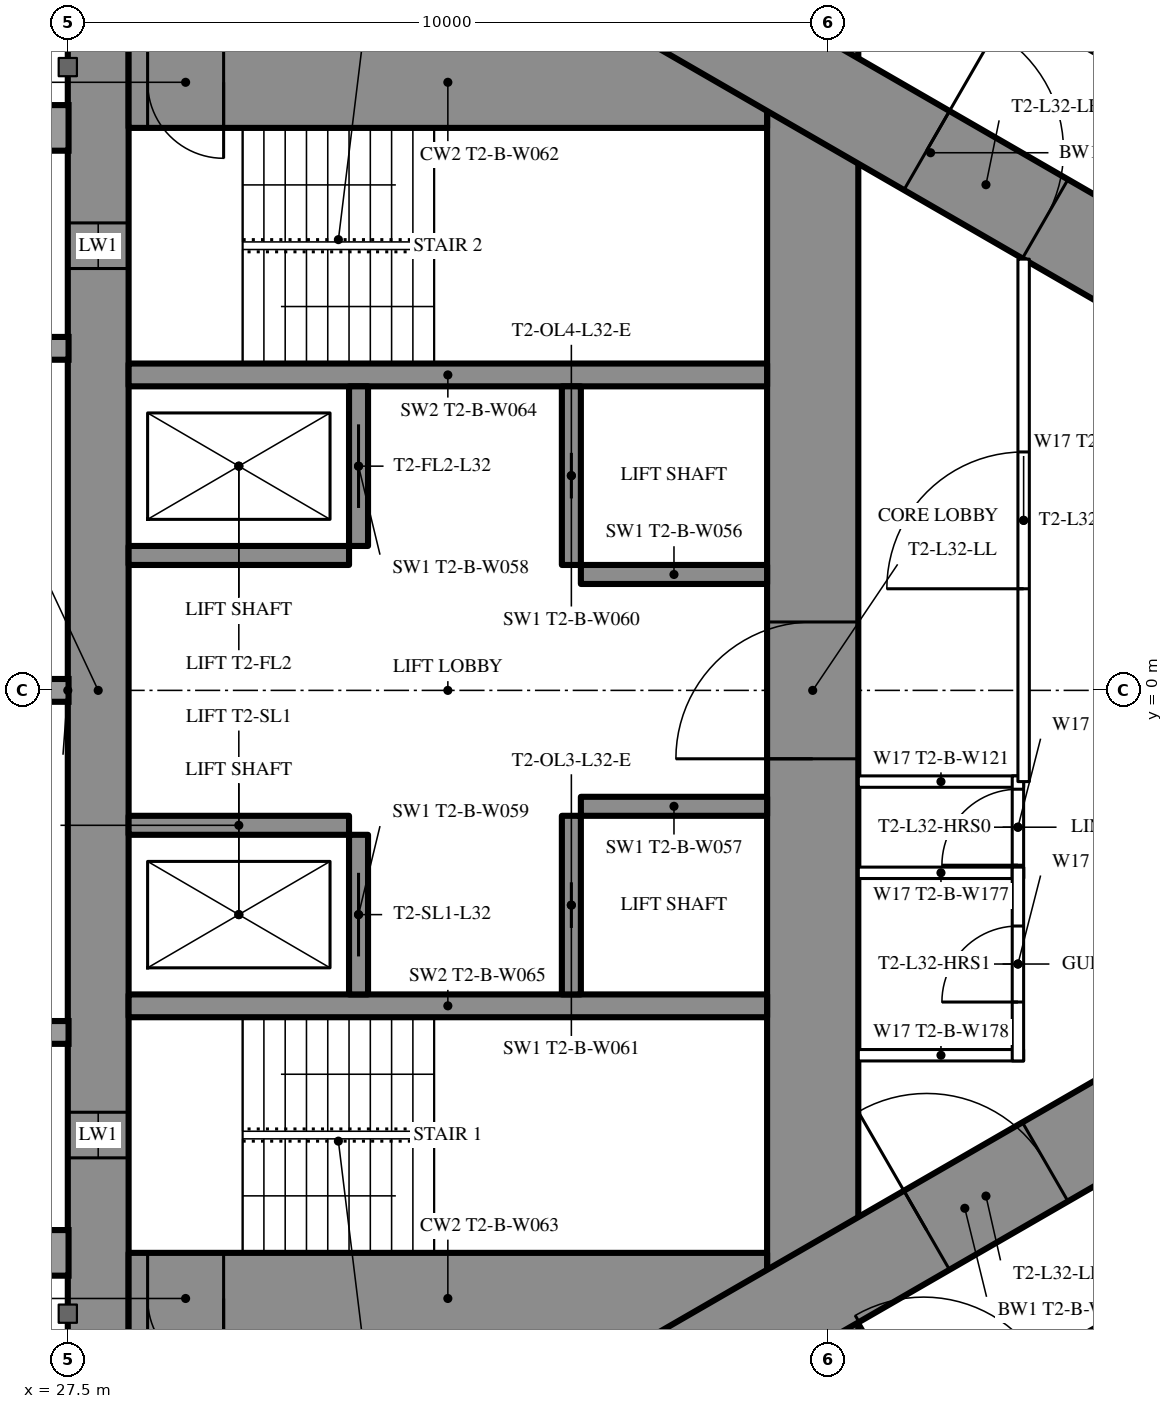
"""IFC4 building model, lengths in metres.
Left out: names, types, materials, properties, quantities, classifications, styles, units other than length and angle.
Written with IfcOpenShell. Run it as: python <this file> out.ifc"""

import sys

from ifc_helpers import new_model, si_unit, direction, frame, frame_2d, origin, place, context, subcontext, project, spatial, rectangle, extrude, element, fill, save


model = new_model("IFC4")
c1 = context("Model", 3, precision=1e-05, world=origin(), true_north=direction((0.0, 1.0)))
c2 = subcontext(c1, "Body", "Model", "MODEL_VIEW")
j1 = project(units=[si_unit("LENGTHUNIT", "METRE"), si_unit("PLANEANGLEUNIT", "RADIAN")], contexts=[c1])
p1 = place(None, origin())
s1 = spatial("IfcSite", under=j1, at=p1, CompositionType="ELEMENT")
p2 = place(p1, origin())
s2 = spatial("IfcBuilding", under=s1, at=p2, CompositionType="ELEMENT")
p3 = place(p2, frame((0.0, 0.0, 122.1)))
s3 = spatial("IfcBuildingStorey", under=s2, at=p3, CompositionType="ELEMENT", Elevation=122.1)
p4 = place(p3, frame((27.9, -8.6, 0.0), z_axis=(0.0, 0.0, 1.0), x_axis=(0.0, 1.0, 0.0)))
e1 = element("IfcWall", 1, at=p4, inside=s3, PredefinedType="SHEAR", context=c2, shape_type="SweptSolid", body=[
    extrude(rectangle(XDim=17.2, YDim=0.8, at=frame_2d((8.6, 0.0))), origin(), (0.0, 0.0, 1.0), 3.5),
])
p5 = place(p4, frame((2.45, 0.0, 0.6)))
e2 = element("IfcOpeningElement", 2, at=p5, cuts=e1, PredefinedType="OPENING", context=c2, shape_type="SweptSolid", body=[
    extrude(rectangle(XDim=0.6, YDim=2.1, at=frame_2d((0.3, 1.05))), frame((0.0, 0.41, 0.0), z_axis=(0.0, -1.0, 0.0), x_axis=(1.0, 0.0, 0.0)), (0.0, 0.0, 1.0), 0.82),
])
p6 = place(p4, frame((14.15, 0.0, 0.6)))
e3 = element("IfcOpeningElement", 3, at=p6, cuts=e1, PredefinedType="OPENING", context=c2, shape_type="SweptSolid", body=[
    extrude(rectangle(XDim=0.6, YDim=2.1, at=frame_2d((0.3, 1.05))), frame((0.0, 0.41, 0.0), z_axis=(0.0, -1.0, 0.0), x_axis=(1.0, 0.0, 0.0)), (0.0, 0.0, 1.0), 0.82),
])
p7 = place(p3, frame((37.3, -8.6, 0.0), z_axis=(0.0, 0.0, 1.0), x_axis=(0.0, 1.0, 0.0)))
e4 = element("IfcWall", 4, at=p7, inside=s3, PredefinedType="SHEAR", context=c2, shape_type="SweptSolid", body=[
    extrude(rectangle(XDim=17.2, YDim=1.2, at=frame_2d((8.6, 0.0))), origin(), (0.0, 0.0, 1.0), 3.5),
])
p8 = place(p7, frame((7.7, 0.0, 0.0)))
e5 = element("IfcOpeningElement", 5, at=p8, cuts=e4, PredefinedType="OPENING", context=c2, shape_type="SweptSolid", body=[
    extrude(rectangle(XDim=1.8, YDim=2.2, at=frame_2d((0.9, 1.1))), frame((0.0, 0.61, 0.0), z_axis=(0.0, -1.0, 0.0), x_axis=(1.0, 0.0, 0.0)), (0.0, 0.0, 1.0), 1.22),
])
p9 = place(p3, frame((28.3, -8.0, 0.0), z_axis=(0.0, 0.0, 1.0), x_axis=(1.0, 0.0, 0.0)))
e6 = element("IfcWall", 6, at=p9, inside=s3, PredefinedType="SHEAR", context=c2, shape_type="SweptSolid", body=[
    extrude(rectangle(XDim=8.4, YDim=1.2, at=frame_2d((4.2, 0.0))), origin(), (0.0, 0.0, 1.0), 3.5),
])
p10 = place(p9, frame((0.25, 0.0, 0.0)))
e7 = element("IfcOpeningElement", 7, at=p10, cuts=e6, PredefinedType="OPENING", context=c2, shape_type="SweptSolid", body=[
    extrude(rectangle(XDim=1.0, YDim=2.2, at=frame_2d((0.5, 1.1))), frame((0.0, 0.61, 0.0), z_axis=(0.0, -1.0, 0.0), x_axis=(1.0, 0.0, 0.0)), (0.0, 0.0, 1.0), 1.22),
])
p11 = place(p3, frame((28.3, 8.0, 0.0), z_axis=(0.0, 0.0, 1.0), x_axis=(1.0, 0.0, 0.0)))
e8 = element("IfcWall", 8, at=p11, inside=s3, PredefinedType="SHEAR", context=c2, shape_type="SweptSolid", body=[
    extrude(rectangle(XDim=8.4, YDim=1.2, at=frame_2d((4.2, 0.0))), origin(), (0.0, 0.0, 1.0), 3.5),
])
p12 = place(p11, frame((0.25, 0.0, 0.0)))
e9 = element("IfcOpeningElement", 9, at=p12, cuts=e8, PredefinedType="OPENING", context=c2, shape_type="SweptSolid", body=[
    extrude(rectangle(XDim=1.0, YDim=2.2, at=frame_2d((0.5, 1.1))), frame((0.0, 0.61, 0.0), z_axis=(0.0, -1.0, 0.0), x_axis=(1.0, 0.0, 0.0)), (0.0, 0.0, 1.0), 1.22),
])
for number, where, z_axis, x_axis in (
    (10, (28.3, -4.15, 0.0), (0.0, 0.0, 1.0), (1.0, 0.0, 0.0)),
    (11, (28.3, 4.15, 0.0), (0.0, 0.0, 1.0), (1.0, 0.0, 0.0)),
):
    element("IfcWall", number, at=place(p3, frame(where, z_axis=z_axis, x_axis=x_axis)), inside=s3, PredefinedType="SHEAR", context=c2, shape_type="SweptSolid", body=[
        extrude(rectangle(XDim=8.4, YDim=0.3, at=frame_2d((4.2, 0.0))), origin(), (0.0, 0.0, 1.0), 3.5),
    ])
p13 = place(p3, frame((31.325, -4.0, 0.0), z_axis=(0.0, 0.0, 1.0), x_axis=(0.0, 1.0, 0.0)))
e12 = element("IfcWall", 12, at=p13, inside=s3, PredefinedType="SHEAR", context=c2, shape_type="SweptSolid", body=[
    extrude(rectangle(XDim=2.1, YDim=0.25, at=frame_2d((1.05, 0.0))), origin(), (0.0, 0.0, 1.0), 3.5),
])
p14 = place(p13, frame((0.5, 0.0, 0.0)))
e13 = element("IfcOpeningElement", 13, at=p14, cuts=e12, PredefinedType="OPENING", context=c2, shape_type="SweptSolid", body=[
    extrude(rectangle(XDim=1.1, YDim=2.2, at=frame_2d((0.55, 1.1))), frame((0.0, 0.135, 0.0), z_axis=(0.0, -1.0, 0.0), x_axis=(1.0, 0.0, 0.0)), (0.0, 0.0, 1.0), 0.27),
])
p15 = place(p3, frame((34.125, -4.0, 0.0), z_axis=(0.0, 0.0, 1.0), x_axis=(0.0, 1.0, 0.0)))
e14 = element("IfcWall", 14, at=p15, inside=s3, PredefinedType="SHEAR", context=c2, shape_type="SweptSolid", body=[
    extrude(rectangle(XDim=2.35, YDim=0.25, at=frame_2d((1.175, 0.0))), origin(), (0.0, 0.0, 1.0), 3.5),
])
p16 = place(p15, frame((0.875, 0.0, 0.0)))
e15 = element("IfcOpeningElement", 15, at=p16, cuts=e14, PredefinedType="OPENING", context=c2, shape_type="SweptSolid", body=[
    extrude(rectangle(XDim=0.6, YDim=2.0, at=frame_2d((0.3, 1.0))), frame((0.0, 0.135, 0.0), z_axis=(0.0, -1.0, 0.0), x_axis=(1.0, 0.0, 0.0)), (0.0, 0.0, 1.0), 0.27),
])
p17 = place(p3, frame((28.3, -1.775, 0.0), z_axis=(0.0, 0.0, 1.0), x_axis=(1.0, 0.0, 0.0)))
e16 = element("IfcWall", 16, at=p17, inside=s3, PredefinedType="SHEAR", context=c2, shape_type="SweptSolid", body=[
    extrude(rectangle(XDim=2.9, YDim=0.25, at=frame_2d((1.45, 0.0))), origin(), (0.0, 0.0, 1.0), 3.5),
])
p18 = place(p3, frame((34.25, -1.525, 0.0), z_axis=(0.0, 0.0, 1.0), x_axis=(1.0, 0.0, 0.0)))
e17 = element("IfcWall", 17, at=p18, inside=s3, PredefinedType="SHEAR", context=c2, shape_type="SweptSolid", body=[
    extrude(rectangle(XDim=2.45, YDim=0.25, at=frame_2d((1.225, 0.0))), origin(), (0.0, 0.0, 1.0), 3.5),
])
p19 = place(p3, frame((31.325, 1.9, 0.0), z_axis=(0.0, 0.0, 1.0), x_axis=(0.0, 1.0, 0.0)))
e18 = element("IfcWall", 18, at=p19, inside=s3, PredefinedType="SHEAR", context=c2, shape_type="SweptSolid", body=[
    extrude(rectangle(XDim=2.1, YDim=0.25, at=frame_2d((1.05, 0.0))), origin(), (0.0, 0.0, 1.0), 3.5),
])
p20 = place(p19, frame((0.5, 0.0, 0.0)))
e19 = element("IfcOpeningElement", 19, at=p20, cuts=e18, PredefinedType="OPENING", context=c2, shape_type="SweptSolid", body=[
    extrude(rectangle(XDim=1.1, YDim=2.2, at=frame_2d((0.55, 1.1))), frame((0.0, 0.135, 0.0), z_axis=(0.0, -1.0, 0.0), x_axis=(1.0, 0.0, 0.0)), (0.0, 0.0, 1.0), 0.27),
])
p21 = place(p3, frame((34.125, 1.65, 0.0), z_axis=(0.0, 0.0, 1.0), x_axis=(0.0, 1.0, 0.0)))
e20 = element("IfcWall", 20, at=p21, inside=s3, PredefinedType="SHEAR", context=c2, shape_type="SweptSolid", body=[
    extrude(rectangle(XDim=2.35, YDim=0.25, at=frame_2d((1.175, 0.0))), origin(), (0.0, 0.0, 1.0), 3.5),
])
p22 = place(p21, frame((0.875, 0.0, 0.0)))
e21 = element("IfcOpeningElement", 21, at=p22, cuts=e20, PredefinedType="OPENING", context=c2, shape_type="SweptSolid", body=[
    extrude(rectangle(XDim=0.6, YDim=2.0, at=frame_2d((0.3, 1.0))), frame((0.0, 0.135, 0.0), z_axis=(0.0, -1.0, 0.0), x_axis=(1.0, 0.0, 0.0)), (0.0, 0.0, 1.0), 0.27),
])
p23 = place(p3, frame((28.3, 1.775, 0.0), z_axis=(0.0, 0.0, 1.0), x_axis=(1.0, 0.0, 0.0)))
e22 = element("IfcWall", 22, at=p23, inside=s3, PredefinedType="SHEAR", context=c2, shape_type="SweptSolid", body=[
    extrude(rectangle(XDim=2.9, YDim=0.25, at=frame_2d((1.45, 0.0))), origin(), (0.0, 0.0, 1.0), 3.5),
])
p24 = place(p3, frame((34.25, 1.525, 0.0), z_axis=(0.0, 0.0, 1.0), x_axis=(1.0, 0.0, 0.0)))
e23 = element("IfcWall", 23, at=p24, inside=s3, PredefinedType="SHEAR", context=c2, shape_type="SweptSolid", body=[
    extrude(rectangle(XDim=2.45, YDim=0.25, at=frame_2d((1.225, 0.0))), origin(), (0.0, 0.0, 1.0), 3.5),
])
p25 = place(p3, frame((27.2, -13.8, 0.0), z_axis=(0.0, 0.0, 1.0), x_axis=(0.866027159892, 0.499996958321, 0.0)))
e24 = element("IfcWall", 24, at=p25, inside=s3, PredefinedType="SHEAR", context=c2, shape_type="SweptSolid", body=[
    extrude(rectangle(XDim=27.947, YDim=1.2, at=frame_2d((13.973, 0.0))), origin(), (0.0, 0.0, 1.0), 3.5),
])
p26 = place(p25, frame((4.6, 0.0, 0.0)))
e25 = element("IfcOpeningElement", 25, at=p26, cuts=e24, PredefinedType="OPENING", context=c2, shape_type="SweptSolid", body=[
    extrude(rectangle(XDim=1.0, YDim=2.2, at=frame_2d((0.5, 1.1))), frame((0.0, 0.61, 0.0), z_axis=(0.0, -1.0, 0.0), x_axis=(1.0, 0.0, 0.0)), (0.0, 0.0, 1.0), 1.22),
])
p27 = place(p25, frame((13.395, 0.0, 0.0)))
e26 = element("IfcOpeningElement", 26, at=p27, cuts=e24, PredefinedType="OPENING", context=c2, shape_type="SweptSolid", body=[
    extrude(rectangle(XDim=1.8, YDim=2.2, at=frame_2d((0.9, 1.1))), frame((0.0, 0.61, 0.0), z_axis=(0.0, -1.0, 0.0), x_axis=(1.0, 0.0, 0.0)), (0.0, 0.0, 1.0), 1.22),
])
p28 = place(p3, frame((27.2, 13.8, 0.0), z_axis=(0.0, 0.0, 1.0), x_axis=(0.866024515034, -0.500001539357, 0.0)))
e27 = element("IfcWall", 27, at=p28, inside=s3, PredefinedType="SHEAR", context=c2, shape_type="SweptSolid", body=[
    extrude(rectangle(XDim=26.907, YDim=1.2, at=frame_2d((13.454, 0.0))), origin(), (0.0, 0.0, 1.0), 3.5),
])
p29 = place(p28, frame((4.6, 0.0, 0.0)))
e28 = element("IfcOpeningElement", 28, at=p29, cuts=e27, PredefinedType="OPENING", context=c2, shape_type="SweptSolid", body=[
    extrude(rectangle(XDim=1.0, YDim=2.2, at=frame_2d((0.5, 1.1))), frame((0.0, 0.61, 0.0), z_axis=(0.0, -1.0, 0.0), x_axis=(1.0, 0.0, 0.0)), (0.0, 0.0, 1.0), 1.22),
])
p30 = place(p28, frame((13.395, 0.0, 0.0)))
e29 = element("IfcOpeningElement", 29, at=p30, cuts=e27, PredefinedType="OPENING", context=c2, shape_type="SweptSolid", body=[
    extrude(rectangle(XDim=1.8, YDim=2.2, at=frame_2d((0.9, 1.1))), frame((0.0, 0.61, 0.0), z_axis=(0.0, -1.0, 0.0), x_axis=(1.0, 0.0, 0.0)), (0.0, 0.0, 1.0), 1.22),
])
p31 = place(p3, frame((36.834, 10.894, 0.0), z_axis=(0.0, 0.0, 1.0), x_axis=(0.866028157229, -0.499995230863, 0.0)))
e30 = element("IfcWall", 30, at=p31, inside=s3, PredefinedType="PARTITIONING", context=c2, shape_type="SweptSolid", body=[
    extrude(rectangle(XDim=21.667, YDim=0.2, at=frame_2d((10.833, 0.0))), origin(), (0.0, 0.0, 1.0), 3.25),
])
p32 = place(p31, frame((20.117, 0.0, 0.0)))
e31 = element("IfcOpeningElement", 31, at=p32, cuts=e30, PredefinedType="OPENING", context=c2, shape_type="SweptSolid", body=[
    extrude(rectangle(XDim=0.95, YDim=2.2, at=frame_2d((0.475, 1.1))), frame((0.0, 0.11, 0.0), z_axis=(0.0, -1.0, 0.0), x_axis=(1.0, 0.0, 0.0)), (0.0, 0.0, 1.0), 0.22),
])
p33 = place(p31, frame((14.04, 0.0, 0.0)))
e32 = element("IfcOpeningElement", 32, at=p33, cuts=e30, PredefinedType="OPENING", context=c2, shape_type="SweptSolid", body=[
    extrude(rectangle(XDim=0.95, YDim=2.2, at=frame_2d((0.475, 1.1))), frame((0.0, 0.11, 0.0), z_axis=(0.0, -1.0, 0.0), x_axis=(1.0, 0.0, 0.0)), (0.0, 0.0, 1.0), 0.22),
])
p34 = place(p31, frame((7.697, 0.0, 0.0)))
e33 = element("IfcOpeningElement", 33, at=p34, cuts=e30, PredefinedType="OPENING", context=c2, shape_type="SweptSolid", body=[
    extrude(rectangle(XDim=0.95, YDim=2.2, at=frame_2d((0.475, 1.1))), frame((0.0, 0.11, 0.0), z_axis=(0.0, -1.0, 0.0), x_axis=(1.0, 0.0, 0.0)), (0.0, 0.0, 1.0), 0.22),
])
p35 = place(p31, frame((3.35, 0.0, 0.0)))
e34 = element("IfcOpeningElement", 34, at=p35, cuts=e30, PredefinedType="OPENING", context=c2, shape_type="SweptSolid", body=[
    extrude(rectangle(XDim=1.0, YDim=2.2, at=frame_2d((0.5, 1.1))), frame((0.0, 0.11, 0.0), z_axis=(0.0, -1.0, 0.0), x_axis=(1.0, 0.0, 0.0)), (0.0, 0.0, 1.0), 0.22),
])
p36 = place(p3, frame((37.96, -10.243, 0.0), z_axis=(0.0, 0.0, 1.0), x_axis=(0.866042886279, 0.499969718208, 0.0)))
e35 = element("IfcWall", 35, at=p36, inside=s3, PredefinedType="PARTITIONING", context=c2, shape_type="SweptSolid", body=[
    extrude(rectangle(XDim=3.647, YDim=0.2, at=frame_2d((1.823, 0.0))), origin(), (0.0, 0.0, 1.0), 3.25),
])
p37 = place(p36, frame((0.923, 0.0, 0.0)))
e36 = element("IfcOpeningElement", 36, at=p37, cuts=e35, PredefinedType="OPENING", context=c2, shape_type="SweptSolid", body=[
    extrude(rectangle(XDim=1.8, YDim=2.2, at=frame_2d((0.9, 1.1))), frame((0.0, 0.11, 0.0), z_axis=(0.0, -1.0, 0.0), x_axis=(1.0, 0.0, 0.0)), (0.0, 0.0, 1.0), 0.22),
])
for number, where, z_axis, x_axis in (
    (37, (37.9, -1.2, 0.0), (0.0, 0.0, 1.0), (1.0, 0.0, 0.0)),
    (38, (37.9, -2.4, 0.0), (0.0, 0.0, 1.0), (1.0, 0.0, 0.0)),
    (39, (37.9, -4.8, 0.0), (0.0, 0.0, 1.0), (1.0, 0.0, 0.0)),
):
    element("IfcWall", number, at=place(p3, frame(where, z_axis=z_axis, x_axis=x_axis)), inside=s3, PredefinedType="PARTITIONING", context=c2, shape_type="SweptSolid", body=[
        extrude(rectangle(XDim=2.175, YDim=0.15, at=frame_2d((1.087, 0.0))), origin(), (0.0, 0.0, 1.0), 3.25),
    ])
p38 = place(p3, frame((40.0, -2.475, 0.0), z_axis=(0.0, 0.0, 1.0), x_axis=(0.0, 1.0, 0.0)))
e40 = element("IfcWall", 40, at=p38, inside=s3, PredefinedType="PARTITIONING", context=c2, shape_type="SweptSolid", body=[
    extrude(rectangle(XDim=1.35, YDim=0.15, at=frame_2d((0.675, 0.0))), origin(), (0.0, 0.0, 1.0), 3.25),
])
p39 = place(p38, frame((0.175, 0.0, 0.0)))
e41 = element("IfcOpeningElement", 41, at=p39, cuts=e40, PredefinedType="OPENING", context=c2, shape_type="SweptSolid", body=[
    extrude(rectangle(XDim=1.0, YDim=2.2, at=frame_2d((0.5, 1.1))), frame((0.0, 0.085, 0.0), z_axis=(0.0, -1.0, 0.0), x_axis=(1.0, 0.0, 0.0)), (0.0, 0.0, 1.0), 0.17),
])
p40 = place(p3, frame((40.0, -4.875, 0.0), z_axis=(0.0, 0.0, 1.0), x_axis=(0.0, 1.0, 0.0)))
e42 = element("IfcWall", 42, at=p40, inside=s3, PredefinedType="PARTITIONING", context=c2, shape_type="SweptSolid", body=[
    extrude(rectangle(XDim=2.55, YDim=0.15, at=frame_2d((1.275, 0.0))), origin(), (0.0, 0.0, 1.0), 3.25),
])
p41 = place(p40, frame((0.775, 0.0, 0.0)))
e43 = element("IfcOpeningElement", 43, at=p41, cuts=e42, PredefinedType="OPENING", context=c2, shape_type="SweptSolid", body=[
    extrude(rectangle(XDim=1.0, YDim=2.2, at=frame_2d((0.5, 1.1))), frame((0.0, 0.085, 0.0), z_axis=(0.0, -1.0, 0.0), x_axis=(1.0, 0.0, 0.0)), (0.0, 0.0, 1.0), 0.17),
])
p42 = place(p3, frame((40.075, -1.2, 0.0), z_axis=(0.0, 0.0, 1.0), x_axis=(0.0, 1.0, 0.0)))
e44 = element("IfcWall", 44, at=p42, inside=s3, PredefinedType="PARTITIONING", context=c2, shape_type="SweptSolid", body=[
    extrude(rectangle(XDim=6.874, YDim=0.15, at=frame_2d((3.437, 0.0))), origin(), (0.0, 0.0, 1.0), 3.25),
])
p43 = place(p42, frame((2.537, 0.0, 0.0)))
e45 = element("IfcOpeningElement", 45, at=p43, cuts=e44, PredefinedType="OPENING", context=c2, shape_type="SweptSolid", body=[
    extrude(rectangle(XDim=1.8, YDim=2.2, at=frame_2d((0.9, 1.1))), frame((0.0, 0.085, 0.0), z_axis=(0.0, -1.0, 0.0), x_axis=(1.0, 0.0, 0.0)), (0.0, 0.0, 1.0), 0.17),
])
p44 = place(p39, origin())
e46 = element("IfcDoor", 46, at=p44, inside=s3, OperationType="SINGLE_SWING_LEFT", PredefinedType="DOOR", context=c2, shape_type="SweptSolid", body=[
    extrude(rectangle(XDim=1.0, YDim=2.2, at=frame_2d((0.5, 1.1))), frame((0.0, 0.025, 0.0), z_axis=(0.0, -1.0, 0.0), x_axis=(1.0, 0.0, 0.0)), (0.0, 0.0, 1.0), 0.05),
])
fill(e41, e46)
p45 = place(p41, origin())
e47 = element("IfcDoor", 47, at=p45, inside=s3, OperationType="SINGLE_SWING_LEFT", PredefinedType="DOOR", context=c2, shape_type="SweptSolid", body=[
    extrude(rectangle(XDim=1.0, YDim=2.2, at=frame_2d((0.5, 1.1))), frame((0.0, 0.025, 0.0), z_axis=(0.0, -1.0, 0.0), x_axis=(1.0, 0.0, 0.0)), (0.0, 0.0, 1.0), 0.05),
])
fill(e43, e47)
p46 = place(p43, origin())
e48 = element("IfcDoor", 48, at=p46, inside=s3, OperationType="DOUBLE_DOOR_SINGLE_SWING", PredefinedType="DOOR", context=c2, shape_type="SweptSolid", body=[
    extrude(rectangle(XDim=1.8, YDim=2.2, at=frame_2d((0.9, 1.1))), frame((0.0, 0.025, 0.0), z_axis=(0.0, -1.0, 0.0), x_axis=(1.0, 0.0, 0.0)), (0.0, 0.0, 1.0), 0.05),
])
fill(e45, e48)
p47 = place(p27, origin())
e49 = element("IfcDoor", 49, at=p47, inside=s3, OperationType="DOUBLE_DOOR_SINGLE_SWING", PredefinedType="DOOR", context=c2, shape_type="SweptSolid", body=[
    extrude(rectangle(XDim=1.8, YDim=2.2, at=frame_2d((0.9, 1.1))), frame((0.0, 0.025, 0.0), z_axis=(0.0, -1.0, 0.0), x_axis=(1.0, 0.0, 0.0)), (0.0, 0.0, 1.0), 0.05),
])
fill(e26, e49)
p48 = place(p30, origin())
e50 = element("IfcDoor", 50, at=p48, inside=s3, OperationType="DOUBLE_DOOR_SINGLE_SWING", PredefinedType="DOOR", context=c2, shape_type="SweptSolid", body=[
    extrude(rectangle(XDim=1.8, YDim=2.2, at=frame_2d((0.9, 1.1))), frame((0.0, 0.025, 0.0), z_axis=(0.0, -1.0, 0.0), x_axis=(1.0, 0.0, 0.0)), (0.0, 0.0, 1.0), 0.05),
])
fill(e29, e50)
p49 = place(p8, origin())
e51 = element("IfcDoor", 51, at=p49, inside=s3, OperationType="DOUBLE_DOOR_SINGLE_SWING", PredefinedType="DOOR", context=c2, shape_type="SweptSolid", body=[
    extrude(rectangle(XDim=1.8, YDim=2.2, at=frame_2d((0.9, 1.1))), frame((0.0, 0.025, 0.0), z_axis=(0.0, -1.0, 0.0), x_axis=(1.0, 0.0, 0.0)), (0.0, 0.0, 1.0), 0.05),
])
fill(e5, e51)
p50 = place(p10, origin())
e52 = element("IfcDoor", 52, at=p50, inside=s3, OperationType="SINGLE_SWING_RIGHT", PredefinedType="DOOR", context=c2, shape_type="SweptSolid", body=[
    extrude(rectangle(XDim=1.0, YDim=2.2, at=frame_2d((0.5, 1.1))), frame((0.0, 0.025, 0.0), z_axis=(0.0, -1.0, 0.0), x_axis=(1.0, 0.0, 0.0)), (0.0, 0.0, 1.0), 0.05),
])
fill(e7, e52)
p51 = place(p12, origin())
e53 = element("IfcDoor", 53, at=p51, inside=s3, OperationType="SINGLE_SWING_RIGHT", PredefinedType="DOOR", context=c2, shape_type="SweptSolid", body=[
    extrude(rectangle(XDim=1.0, YDim=2.2, at=frame_2d((0.5, 1.1))), frame((0.0, 0.025, 0.0), z_axis=(0.0, -1.0, 0.0), x_axis=(1.0, 0.0, 0.0)), (0.0, 0.0, 1.0), 0.05),
])
fill(e9, e53)
p52 = place(p14, origin())
e54 = element("IfcDoor", 54, at=p52, inside=s3, OperationType="SLIDING_TO_LEFT", PredefinedType="USERDEFINED", context=c2, shape_type="SweptSolid", body=[
    extrude(rectangle(XDim=1.1, YDim=2.2, at=frame_2d((0.55, 1.1))), frame((0.0, 0.025, 0.0), z_axis=(0.0, -1.0, 0.0), x_axis=(1.0, 0.0, 0.0)), (0.0, 0.0, 1.0), 0.05),
])
fill(e13, e54)
p53 = place(p20, origin())
e55 = element("IfcDoor", 55, at=p53, inside=s3, OperationType="SLIDING_TO_LEFT", PredefinedType="USERDEFINED", context=c2, shape_type="SweptSolid", body=[
    extrude(rectangle(XDim=1.1, YDim=2.2, at=frame_2d((0.55, 1.1))), frame((0.0, 0.025, 0.0), z_axis=(0.0, -1.0, 0.0), x_axis=(1.0, 0.0, 0.0)), (0.0, 0.0, 1.0), 0.05),
])
fill(e19, e55)
p54 = place(p16, origin())
e56 = element("IfcDoor", 56, at=p54, inside=s3, OperationType="SLIDING_TO_LEFT", PredefinedType="DOOR", context=c2, shape_type="SweptSolid", body=[
    extrude(rectangle(XDim=0.6, YDim=2.0, at=frame_2d((0.3, 1.0))), frame((0.0, 0.025, 0.0), z_axis=(0.0, -1.0, 0.0), x_axis=(1.0, 0.0, 0.0)), (0.0, 0.0, 1.0), 0.05),
])
fill(e15, e56)
p55 = place(p22, origin())
e57 = element("IfcDoor", 57, at=p55, inside=s3, OperationType="SLIDING_TO_LEFT", PredefinedType="DOOR", context=c2, shape_type="SweptSolid", body=[
    extrude(rectangle(XDim=0.6, YDim=2.0, at=frame_2d((0.3, 1.0))), frame((0.0, 0.025, 0.0), z_axis=(0.0, -1.0, 0.0), x_axis=(1.0, 0.0, 0.0)), (0.0, 0.0, 1.0), 0.05),
])
fill(e21, e57)
p56 = place(p5, origin())
e58 = element("IfcWindow", 58, at=p56, inside=s3, PartitioningType="SINGLE_PANEL", PredefinedType="WINDOW", context=c2, shape_type="SweptSolid", body=[
    extrude(rectangle(XDim=0.6, YDim=2.1, at=frame_2d((0.3, 1.05))), frame((0.0, 0.03, 0.0), z_axis=(0.0, -1.0, 0.0), x_axis=(1.0, 0.0, 0.0)), (0.0, 0.0, 1.0), 0.06),
])
fill(e2, e58)
p57 = place(p6, origin())
e59 = element("IfcWindow", 59, at=p57, inside=s3, PartitioningType="SINGLE_PANEL", PredefinedType="WINDOW", context=c2, shape_type="SweptSolid", body=[
    extrude(rectangle(XDim=0.6, YDim=2.1, at=frame_2d((0.3, 1.05))), frame((0.0, 0.03, 0.0), z_axis=(0.0, -1.0, 0.0), x_axis=(1.0, 0.0, 0.0)), (0.0, 0.0, 1.0), 0.06),
])
fill(e3, e59)
save(model, sys.argv[1])
